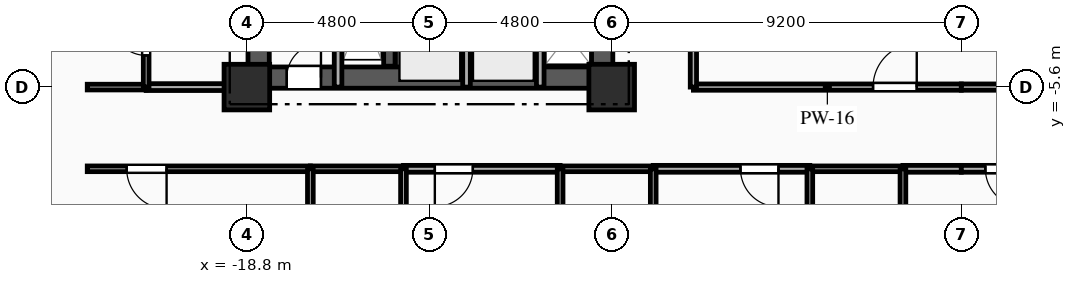
"""IFC4 building model, lengths in metres.
Left out: names, types, materials, properties, quantities, classifications, styles, units other than length and angle.
Written with IfcOpenShell. Run it as: python <this file> out.ifc"""

import sys

from ifc_helpers import new_model, si_unit, direction, frame, frame_2d, origin, origin_2d, place, context, subcontext, project, spatial, rectangle, extrude, element, fill, save


model = new_model("IFC4")
c1 = context("Model", 3, precision=1e-05, world=origin(), true_north=direction((0.0, 1.0)))
c2 = subcontext(c1, "Body", "Model", "MODEL_VIEW")
j1 = project(units=[si_unit("LENGTHUNIT", "METRE"), si_unit("PLANEANGLEUNIT", "RADIAN")], contexts=[c1])
p1 = place(None, origin())
s1 = spatial("IfcSite", under=j1, at=p1, CompositionType="ELEMENT")
p2 = place(p1, origin())
s2 = spatial("IfcBuilding", under=s1, at=p2, CompositionType="ELEMENT")
p3 = place(p2, frame((0.0, 0.0, 60.5)))
s3 = spatial("IfcBuildingStorey", under=s2, at=p3, CompositionType="ELEMENT", Elevation=60.5)
for number, where, z_axis, x_axis in (
    (1, (-18.8, -5.6, 0.0), (0.0, 0.0, 1.0), (1.0, 0.0, 0.0)),
    (2, (-9.2, -5.6, 0.0), (0.0, 0.0, 1.0), (1.0, 0.0, 0.0)),
):
    element("IfcColumn", number, at=place(p3, frame(where, z_axis=z_axis, x_axis=x_axis)), inside=s3, PredefinedType="COLUMN", context=c2, shape_type="SweptSolid", body=[
        extrude(rectangle(XDim=1.2, YDim=1.2, at=origin_2d()), origin(), (0.0, 0.0, 1.0), 3.35),
    ])
p4 = place(p3, frame((-18.8, -5.35, 0.0), z_axis=(0.0, 0.0, 1.0), x_axis=(1.0, 0.0, 0.0)))
e3 = element("IfcWall", 3, at=p4, inside=s3, PredefinedType="SHEAR", context=c2, shape_type="SweptSolid", body=[
    extrude(rectangle(XDim=9.6, YDim=0.56, at=frame_2d((4.8, 0.0))), origin(), (0.0, 0.0, 1.0), 3.035),
])
p5 = place(p4, frame((1.05, 0.0, 0.0)))
e4 = element("IfcOpeningElement", 4, at=p5, cuts=e3, PredefinedType="OPENING", context=c2, shape_type="SweptSolid", body=[
    extrude(rectangle(XDim=0.9, YDim=2.1, at=frame_2d((0.45, 1.05))), frame((0.0, 0.29, 0.0), z_axis=(0.0, -1.0, 0.0), x_axis=(1.0, 0.0, 0.0)), (0.0, 0.0, 1.0), 0.58),
])
p6 = place(p3, frame((-18.49, -5.05, 0.0), z_axis=(0.0, 0.0, 1.0), x_axis=(0.0, 1.0, 0.0)))
e5 = element("IfcWall", 5, at=p6, inside=s3, PredefinedType="SHEAR", context=c2, shape_type="SweptSolid", body=[
    extrude(rectangle(XDim=10.1, YDim=0.56, at=frame_2d((5.05, 0.0))), origin(), (0.0, 0.0, 1.0), 3.035),
])
p7 = place(p3, frame((-9.45, -5.05, 0.0), z_axis=(0.0, 0.0, 1.0), x_axis=(0.0, 1.0, 0.0)))
e6 = element("IfcWall", 6, at=p7, inside=s3, PredefinedType="SHEAR", context=c2, shape_type="SweptSolid", body=[
    extrude(rectangle(XDim=10.1, YDim=0.56, at=frame_2d((5.05, 0.0))), origin(), (0.0, 0.0, 1.0), 3.035),
])
p8 = place(p7, frame((7.175, 0.0, 0.0)))
e7 = element("IfcOpeningElement", 7, at=p8, cuts=e6, PredefinedType="OPENING", context=c2, shape_type="SweptSolid", body=[
    extrude(rectangle(XDim=0.9, YDim=2.1, at=frame_2d((0.45, 1.05))), frame((0.0, 0.29, 0.0), z_axis=(0.0, -1.0, 0.0), x_axis=(1.0, 0.0, 0.0)), (0.0, 0.0, 1.0), 0.58),
])
p9 = place(p7, frame((2.4, 0.0, 0.0)))
e8 = element("IfcOpeningElement", 8, at=p9, cuts=e6, PredefinedType="OPENING", context=c2, shape_type="SweptSolid", body=[
    extrude(rectangle(XDim=1.2, YDim=2.15, at=frame_2d((0.6, 1.075))), frame((0.0, 0.29, 0.0), z_axis=(0.0, -1.0, 0.0), x_axis=(1.0, 0.0, 0.0)), (0.0, 0.0, 1.0), 0.58),
])
p10 = place(p3, frame((-15.05, -5.05, 0.0), z_axis=(0.0, 0.0, 1.0), x_axis=(0.0, 1.0, 0.0)))
e9 = element("IfcWall", 9, at=p10, inside=s3, PredefinedType="SHEAR", context=c2, shape_type="SweptSolid", body=[
    extrude(rectangle(XDim=10.1, YDim=0.3, at=frame_2d((5.05, 0.0))), origin(), (0.0, 0.0, 1.0), 3.035),
])
p11 = place(p3, frame((-16.4, -5.6, 0.0), z_axis=(0.0, 0.0, 1.0), x_axis=(0.0, 1.0, 0.0)))
e10 = element("IfcWall", 10, at=p11, inside=s3, PredefinedType="PARTITIONING", context=c2, shape_type="SweptSolid", body=[
    extrude(rectangle(XDim=3.49, YDim=0.2, at=frame_2d((1.745, 0.0))), origin(), (0.0, 0.0, 1.0), 3.035),
])
for number, where, z_axis, x_axis in (
    (11, (-13.02, -5.6, 0.0), (0.0, 0.0, 1.0), (0.0, 1.0, 0.0)),
    (12, (-11.08, -5.6, 0.0), (0.0, 0.0, 1.0), (0.0, 1.0, 0.0)),
):
    element("IfcWall", number, at=place(p3, frame(where, z_axis=z_axis, x_axis=x_axis)), inside=s3, PredefinedType="PARTITIONING", context=c2, shape_type="SweptSolid", body=[
        extrude(rectangle(XDim=2.25, YDim=0.2, at=frame_2d((1.125, 0.0))), origin(), (0.0, 0.0, 1.0), 3.035),
    ])
p12 = place(p3, frame((-21.45, -5.6, 0.0), z_axis=(0.0, 0.0, 1.0), x_axis=(1.0, 0.0, 0.0)))
e13 = element("IfcWall", 13, at=p12, inside=s3, PredefinedType="PARTITIONING", context=c2, shape_type="SweptSolid", body=[
    extrude(rectangle(XDim=2.65, YDim=0.18, at=frame_2d((1.325, 0.0))), origin(), (0.0, 0.0, 1.0), 3.035),
])
p13 = place(p3, frame((-23.0, -5.6, 0.0), z_axis=(0.0, 0.0, 1.0), x_axis=(1.0, 0.0, 0.0)))
e14 = element("IfcWall", 14, at=p13, inside=s3, PredefinedType="PLUMBINGWALL", context=c2, shape_type="SweptSolid", body=[
    extrude(rectangle(XDim=1.55, YDim=0.15, at=frame_2d((0.775, 0.0))), origin(), (0.0, 0.0, 1.0), 3.035),
])
p14 = place(p3, frame((-17.129, -7.75, 0.0), z_axis=(0.0, 0.0, 1.0), x_axis=(-1.0, 0.0, 0.0)))
e15 = element("IfcWall", 15, at=p14, inside=s3, PredefinedType="PARTITIONING", context=c2, shape_type="SweptSolid", body=[
    extrude(rectangle(XDim=5.871, YDim=0.15, at=frame_2d((2.936, 0.0))), origin(), (0.0, 0.0, 1.0), 3.035),
])
p15 = place(p14, frame((3.783, 0.0, 0.0)))
e16 = element("IfcOpeningElement", 16, at=p15, cuts=e15, PredefinedType="OPENING", context=c2, shape_type="SweptSolid", body=[
    extrude(rectangle(XDim=1.05, YDim=2.15, at=frame_2d((0.525, 1.075))), frame((0.0, 0.085, 0.0), z_axis=(0.0, -1.0, 0.0), x_axis=(1.0, 0.0, 0.0)), (0.0, 0.0, 1.0), 0.17),
])
p16 = place(p3, frame((-10.557, -7.75, 0.0), z_axis=(0.0, 0.0, 1.0), x_axis=(-1.0, 0.0, 0.0)))
e17 = element("IfcWall", 17, at=p16, inside=s3, PredefinedType="PARTITIONING", context=c2, shape_type="SweptSolid", body=[
    extrude(rectangle(XDim=4.122, YDim=0.18, at=frame_2d((2.061, 0.0))), origin(), (0.0, 0.0, 1.0), 3.035),
])
p17 = place(p16, frame((2.297, 0.0, 0.0)))
e18 = element("IfcOpeningElement", 18, at=p17, cuts=e17, PredefinedType="OPENING", context=c2, shape_type="SweptSolid", body=[
    extrude(rectangle(XDim=1.0, YDim=2.15, at=frame_2d((0.5, 1.075))), frame((0.0, 0.1, 0.0), z_axis=(0.0, -1.0, 0.0), x_axis=(1.0, 0.0, 0.0)), (0.0, 0.0, 1.0), 0.2),
])
p18 = place(p3, frame((-14.679, -7.75, 0.0), z_axis=(0.0, 0.0, 1.0), x_axis=(-1.0, 0.0, 0.0)))
e19 = element("IfcWall", 19, at=p18, inside=s3, PredefinedType="PLUMBINGWALL", context=c2, shape_type="SweptSolid", body=[
    extrude(rectangle(XDim=2.45, YDim=0.15, at=frame_2d((1.225, 0.0))), origin(), (0.0, 0.0, 1.0), 3.035),
])
p19 = place(p3, frame((-3.986, -7.75, 0.0), z_axis=(0.0, 0.0, 1.0), x_axis=(-1.0, 0.0, 0.0)))
e20 = element("IfcWall", 20, at=p19, inside=s3, PredefinedType="PARTITIONING", context=c2, shape_type="SweptSolid", body=[
    extrude(rectangle(XDim=4.121, YDim=0.18, at=frame_2d((2.061, 0.0))), origin(), (0.0, 0.0, 1.0), 3.035),
])
p20 = place(p19, frame((0.825, 0.0, 0.0)))
e21 = element("IfcOpeningElement", 21, at=p20, cuts=e20, PredefinedType="OPENING", context=c2, shape_type="SweptSolid", body=[
    extrude(rectangle(XDim=1.0, YDim=2.15, at=frame_2d((0.5, 1.075))), frame((0.0, 0.1, 0.0), z_axis=(0.0, -1.0, 0.0), x_axis=(1.0, 0.0, 0.0)), (0.0, 0.0, 1.0), 0.2),
])
p21 = place(p3, frame((-8.107, -7.75, 0.0), z_axis=(0.0, 0.0, 1.0), x_axis=(-1.0, 0.0, 0.0)))
e22 = element("IfcWall", 22, at=p21, inside=s3, PredefinedType="PLUMBINGWALL", context=c2, shape_type="SweptSolid", body=[
    extrude(rectangle(XDim=2.45, YDim=0.15, at=frame_2d((1.225, 0.0))), origin(), (0.0, 0.0, 1.0), 3.035),
])
p22 = place(p3, frame((0.0, -7.75, 0.0), z_axis=(0.0, 0.0, 1.0), x_axis=(-1.0, 0.0, 0.0)))
e23 = element("IfcWall", 23, at=p22, inside=s3, PredefinedType="PARTITIONING", context=c2, shape_type="SweptSolid", body=[
    extrude(rectangle(XDim=1.536, YDim=0.18, at=frame_2d((0.768, 0.0))), origin(), (0.0, 0.0, 1.0), 3.035),
])
p23 = place(p3, frame((-1.536, -7.75, 0.0), z_axis=(0.0, 0.0, 1.0), x_axis=(-1.0, 0.0, 0.0)))
e24 = element("IfcWall", 24, at=p23, inside=s3, PredefinedType="PLUMBINGWALL", context=c2, shape_type="SweptSolid", body=[
    extrude(rectangle(XDim=2.45, YDim=0.15, at=frame_2d((1.225, 0.0))), origin(), (0.0, 0.0, 1.0), 3.035),
])
p24 = place(p3, frame((-7.05, -5.6, 0.0), z_axis=(0.0, 0.0, 1.0), x_axis=(1.0, 0.0, 0.0)))
e25 = element("IfcWall", 25, at=p24, inside=s3, PredefinedType="PARTITIONING", context=c2, shape_type="SweptSolid", body=[
    extrude(rectangle(XDim=7.05, YDim=0.165, at=frame_2d((3.525, 0.0))), origin(), (0.0, 0.0, 1.0), 2.52),
])
p25 = place(p24, frame((4.728, 0.0, 0.0)))
e26 = element("IfcOpeningElement", 26, at=p25, cuts=e25, PredefinedType="OPENING", context=c2, shape_type="SweptSolid", body=[
    extrude(rectangle(XDim=1.15, YDim=2.15, at=frame_2d((0.575, 1.075))), frame((0.0, 0.093, 0.0), z_axis=(0.0, -1.0, 0.0), x_axis=(1.0, 0.0, 0.0)), (0.0, 0.0, 1.0), 0.185),
])
p26 = place(p3, frame((2.586, -7.75, 0.0), z_axis=(0.0, 0.0, 1.0), x_axis=(-1.0, 0.0, 0.0)))
e27 = element("IfcWall", 27, at=p26, inside=s3, PredefinedType="PARTITIONING", context=c2, shape_type="SweptSolid", body=[
    extrude(rectangle(XDim=2.586, YDim=0.18, at=frame_2d((1.293, 0.0))), origin(), (0.0, 0.0, 1.0), 3.035),
])
p27 = place(p26, frame((0.953, 0.0, 0.0)))
e28 = element("IfcOpeningElement", 28, at=p27, cuts=e27, PredefinedType="OPENING", context=c2, shape_type="SweptSolid", body=[
    extrude(rectangle(XDim=1.0, YDim=2.15, at=frame_2d((0.5, 1.075))), frame((0.0, 0.1, 0.0), z_axis=(0.0, -1.0, 0.0), x_axis=(1.0, 0.0, 0.0)), (0.0, 0.0, 1.0), 0.2),
])
p28 = place(p3, frame((0.0, -5.6, 0.0), z_axis=(0.0, 0.0, 1.0), x_axis=(1.0, 0.0, 0.0)))
e29 = element("IfcWall", 29, at=p28, inside=s3, PredefinedType="PARTITIONING", context=c2, shape_type="SweptSolid", body=[
    extrude(rectangle(XDim=7.05, YDim=0.165, at=frame_2d((3.525, 0.0))), origin(), (0.0, 0.0, 1.0), 2.52),
])
p29 = place(p3, frame((-7.05, 1.45, 0.0), z_axis=(0.0, 0.0, 1.0), x_axis=(0.0, -1.0, 0.0)))
e30 = element("IfcWall", 30, at=p29, inside=s3, PredefinedType="PARTITIONING", context=c2, shape_type="SweptSolid", body=[
    extrude(rectangle(XDim=7.05, YDim=0.165, at=frame_2d((3.525, 0.0))), origin(), (0.0, 0.0, 1.0), 3.035),
])
p30 = place(p3, frame((-21.45, -5.6, 0.0), z_axis=(0.0, 0.0, 1.0), x_axis=(0.0, 1.0, 0.0)))
e31 = element("IfcWall", 31, at=p30, inside=s3, PredefinedType="PLUMBINGWALL", context=c2, shape_type="SweptSolid", body=[
    extrude(rectangle(XDim=2.35, YDim=0.15, at=frame_2d((1.175, 0.0))), origin(), (0.0, 0.0, 1.0), 3.035),
])
p31 = place(p30, frame((0.834, 0.0, 0.0)))
e32 = element("IfcOpeningElement", 32, at=p31, cuts=e31, PredefinedType="OPENING", context=c2, shape_type="SweptSolid", body=[
    extrude(rectangle(XDim=0.9, YDim=2.1, at=frame_2d((0.45, 1.05))), frame((0.0, 0.085, 0.0), z_axis=(0.0, -1.0, 0.0), x_axis=(1.0, 0.0, 0.0)), (0.0, 0.0, 1.0), 0.17),
])
for number, where, z_axis, x_axis in (
    (33, (-17.129, -7.75, 0.0), (0.0, 0.0, 1.0), (0.0, -1.0, 0.0)),
    (34, (-14.679, -9.9, 0.0), (0.0, 0.0, 1.0), (0.0, 1.0, 0.0)),
    (35, (-10.557, -7.75, 0.0), (0.0, 0.0, 1.0), (0.0, -1.0, 0.0)),
    (36, (-8.107, -9.9, 0.0), (0.0, 0.0, 1.0), (0.0, 1.0, 0.0)),
    (37, (-3.986, -7.75, 0.0), (0.0, 0.0, 1.0), (0.0, -1.0, 0.0)),
    (38, (-1.536, -9.9, 0.0), (0.0, 0.0, 1.0), (0.0, 1.0, 0.0)),
):
    element("IfcWall", number, at=place(p3, frame(where, z_axis=z_axis, x_axis=x_axis)), inside=s3, PredefinedType="PLUMBINGWALL", context=c2, shape_type="SweptSolid", body=[
        extrude(rectangle(XDim=2.15, YDim=0.15, at=frame_2d((1.075, 0.0))), origin(), (0.0, 0.0, 1.0), 3.035),
    ])
p32 = place(p5, origin())
e39 = element("IfcDoor", 39, at=p32, inside=s3, OperationType="SINGLE_SWING_RIGHT", PredefinedType="DOOR", context=c2, shape_type="SweptSolid", body=[
    extrude(rectangle(XDim=0.9, YDim=2.1, at=frame_2d((0.45, 1.05))), frame((0.0, 0.025, 0.0), z_axis=(0.0, -1.0, 0.0), x_axis=(1.0, 0.0, 0.0)), (0.0, 0.0, 1.0), 0.05),
])
fill(e4, e39)
p33 = place(p15, origin())
e40 = element("IfcDoor", 40, at=p33, inside=s3, OperationType="SINGLE_SWING_LEFT", PredefinedType="DOOR", context=c2, shape_type="SweptSolid", body=[
    extrude(rectangle(XDim=1.05, YDim=2.15, at=frame_2d((0.525, 1.075))), frame((0.0, 0.025, 0.0), z_axis=(0.0, -1.0, 0.0), x_axis=(1.0, 0.0, 0.0)), (0.0, 0.0, 1.0), 0.05),
])
fill(e16, e40)
p34 = place(p17, origin())
e41 = element("IfcDoor", 41, at=p34, inside=s3, OperationType="SINGLE_SWING_RIGHT", PredefinedType="DOOR", context=c2, shape_type="SweptSolid", body=[
    extrude(rectangle(XDim=1.0, YDim=2.15, at=frame_2d((0.5, 1.075))), frame((0.0, 0.025, 0.0), z_axis=(0.0, -1.0, 0.0), x_axis=(1.0, 0.0, 0.0)), (0.0, 0.0, 1.0), 0.05),
])
fill(e18, e41)
p35 = place(p20, origin())
e42 = element("IfcDoor", 42, at=p35, inside=s3, OperationType="SINGLE_SWING_LEFT", PredefinedType="DOOR", context=c2, shape_type="SweptSolid", body=[
    extrude(rectangle(XDim=1.0, YDim=2.15, at=frame_2d((0.5, 1.075))), frame((0.0, 0.025, 0.0), z_axis=(0.0, -1.0, 0.0), x_axis=(1.0, 0.0, 0.0)), (0.0, 0.0, 1.0), 0.05),
])
fill(e21, e42)
p36 = place(p25, origin())
e43 = element("IfcDoor", 43, at=p36, inside=s3, OperationType="SINGLE_SWING_RIGHT", PredefinedType="DOOR", context=c2, shape_type="SweptSolid", body=[
    extrude(rectangle(XDim=1.15, YDim=2.15, at=frame_2d((0.575, 1.075))), frame((0.0, 0.025, 0.0), z_axis=(0.0, -1.0, 0.0), x_axis=(1.0, 0.0, 0.0)), (0.0, 0.0, 1.0), 0.05),
])
fill(e26, e43)
p37 = place(p27, origin())
e44 = element("IfcDoor", 44, at=p37, inside=s3, OperationType="SINGLE_SWING_LEFT", PredefinedType="DOOR", context=c2, shape_type="SweptSolid", body=[
    extrude(rectangle(XDim=1.0, YDim=2.15, at=frame_2d((0.5, 1.075))), frame((0.0, 0.025, 0.0), z_axis=(0.0, -1.0, 0.0), x_axis=(1.0, 0.0, 0.0)), (0.0, 0.0, 1.0), 0.05),
])
fill(e28, e44)
p38 = place(p31, origin())
e45 = element("IfcDoor", 45, at=p38, inside=s3, OperationType="SINGLE_SWING_RIGHT", PredefinedType="DOOR", context=c2, shape_type="SweptSolid", body=[
    extrude(rectangle(XDim=0.9, YDim=2.1, at=frame_2d((0.45, 1.05))), frame((0.0, 0.025, 0.0), z_axis=(0.0, -1.0, 0.0), x_axis=(1.0, 0.0, 0.0)), (0.0, 0.0, 1.0), 0.05),
])
fill(e32, e45)
save(model, sys.argv[1])
